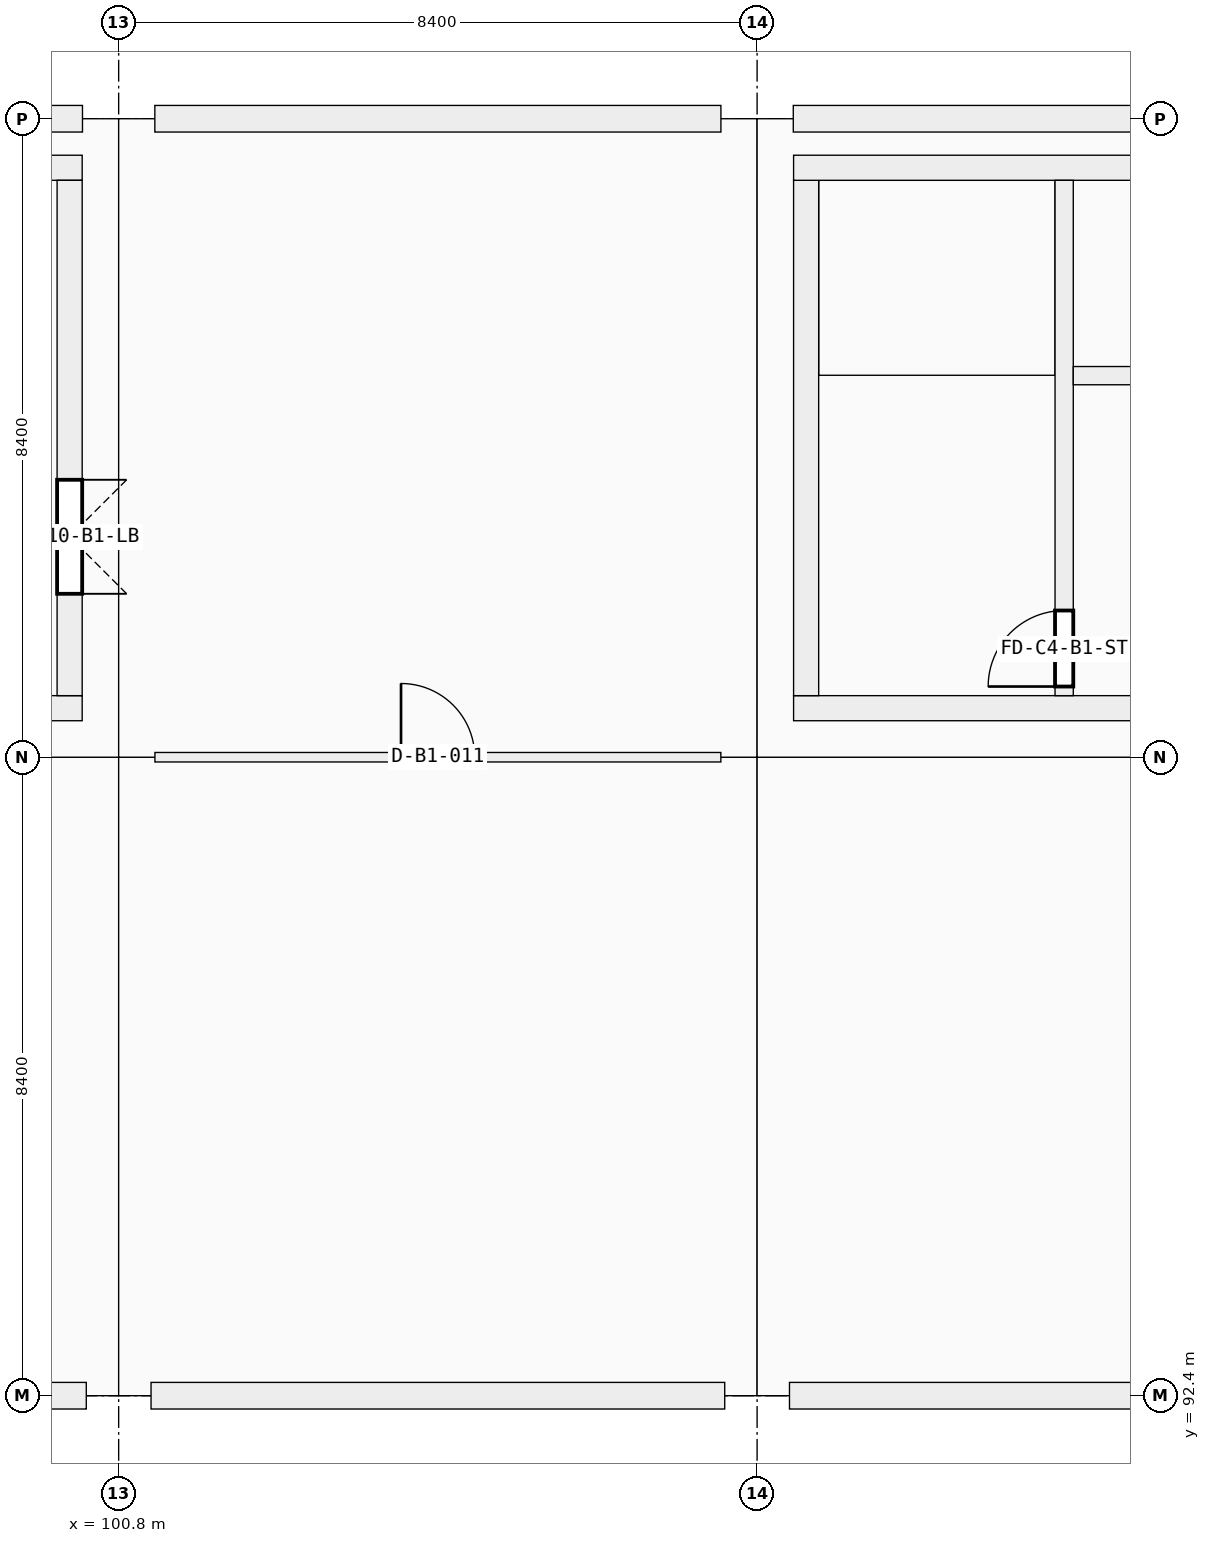
"""IFC4 building model, lengths in metres.
Left out: names, types, materials, properties, quantities, classifications, styles, units other than length and angle.
Written with IfcOpenShell. Run it as: python <this file> out.ifc"""

import sys

from ifc_helpers import new_model, si_unit, direction, frame, frame_2d, origin, origin_2d, place, context, subcontext, project, spatial, rectangle, extrude, element, fill, save


model = new_model("IFC4")
c1 = context("Model", 3, precision=1e-05, world=origin(), true_north=direction((0.0, 1.0)))
c2 = subcontext(c1, "Body", "Model", "MODEL_VIEW")
j1 = project(units=[si_unit("LENGTHUNIT", "METRE"), si_unit("PLANEANGLEUNIT", "RADIAN")], contexts=[c1])
p1 = place(None, origin())
s1 = spatial("IfcSite", under=j1, at=p1, CompositionType="ELEMENT")
p2 = place(p1, origin())
s2 = spatial("IfcBuilding", under=s1, at=p2, CompositionType="ELEMENT")
p3 = place(p2, frame((0.0, 0.0, -4.5)))
s3 = spatial("IfcBuildingStorey", under=s2, at=p3, CompositionType="ELEMENT", Elevation=-4.5)
p4 = place(p3, frame((100.8, 92.4, -0.35), z_axis=(0.0, 0.0, 1.0), x_axis=(1.0, 0.0, 0.0)))
e1 = element("IfcColumn", 1, at=p4, inside=s3, PredefinedType="COLUMN", context=c2, shape_type="SweptSolid", body=[
    extrude(rectangle(XDim=0.85, YDim=0.85, at=origin_2d()), origin(), (0.0, 0.0, 1.0), 4.5),
])
for number, where, z_axis, x_axis in (
    (2, (100.8, 100.8, -0.35), (0.0, 0.0, 1.0), (1.0, 0.0, 0.0)),
    (3, (100.8, 109.2, -0.35), (0.0, 0.0, 1.0), (1.0, 0.0, 0.0)),
):
    element("IfcColumn", number, at=place(p3, frame(where, z_axis=z_axis, x_axis=x_axis)), inside=s3, PredefinedType="COLUMN", context=c2, shape_type="SweptSolid", body=[
        extrude(rectangle(XDim=0.95, YDim=0.95, at=origin_2d()), origin(), (0.0, 0.0, 1.0), 4.85),
    ])
p5 = place(p3, frame((109.2, 92.4, -0.35), z_axis=(0.0, 0.0, 1.0), x_axis=(1.0, 0.0, 0.0)))
e4 = element("IfcColumn", 4, at=p5, inside=s3, PredefinedType="COLUMN", context=c2, shape_type="SweptSolid", body=[
    extrude(rectangle(XDim=0.85, YDim=0.85, at=origin_2d()), origin(), (0.0, 0.0, 1.0), 4.5),
])
for number, where, z_axis, x_axis in (
    (5, (109.2, 100.8, -0.35), (0.0, 0.0, 1.0), (1.0, 0.0, 0.0)),
    (6, (109.2, 109.2, -0.35), (0.0, 0.0, 1.0), (1.0, 0.0, 0.0)),
):
    element("IfcColumn", number, at=place(p3, frame(where, z_axis=z_axis, x_axis=x_axis)), inside=s3, PredefinedType="COLUMN", context=c2, shape_type="SweptSolid", body=[
        extrude(rectangle(XDim=0.95, YDim=0.95, at=origin_2d()), origin(), (0.0, 0.0, 1.0), 4.85),
    ])
p6 = place(p3, frame((100.374, 92.4, 0.0), z_axis=(0.0, 0.0, 1.0), x_axis=(-1.0, 0.0, 0.0)))
e7 = element("IfcWall", 7, at=p6, inside=s3, PredefinedType="SOLIDWALL", context=c2, shape_type="SweptSolid", body=[
    extrude(rectangle(XDim=7.548, YDim=0.35, at=frame_2d((3.774, 0.0))), origin(), (0.0, 0.0, 1.0), 3.35),
])
p7 = place(p3, frame((92.876, 109.2, 0.0), z_axis=(0.0, 0.0, 1.0), x_axis=(1.0, 0.0, 0.0)))
e8 = element("IfcWall", 8, at=p7, inside=s3, PredefinedType="SOLIDWALL", context=c2, shape_type="SweptSolid", body=[
    extrude(rectangle(XDim=7.448, YDim=0.35, at=frame_2d((3.724, 0.0))), origin(), (0.0, 0.0, 1.0), 3.35),
])
p8 = place(p3, frame((108.774, 92.4, 0.0), z_axis=(0.0, 0.0, 1.0), x_axis=(-1.0, 0.0, 0.0)))
e9 = element("IfcWall", 9, at=p8, inside=s3, PredefinedType="SOLIDWALL", context=c2, shape_type="SweptSolid", body=[
    extrude(rectangle(XDim=7.548, YDim=0.35, at=frame_2d((3.774, 0.0))), origin(), (0.0, 0.0, 1.0), 3.35),
])
p9 = place(p3, frame((101.276, 109.2, 0.0), z_axis=(0.0, 0.0, 1.0), x_axis=(1.0, 0.0, 0.0)))
e10 = element("IfcWall", 10, at=p9, inside=s3, PredefinedType="SOLIDWALL", context=c2, shape_type="SweptSolid", body=[
    extrude(rectangle(XDim=7.448, YDim=0.35, at=frame_2d((3.724, 0.0))), origin(), (0.0, 0.0, 1.0), 3.35),
])
p10 = place(p3, frame((117.149, 92.4, 0.0), z_axis=(0.0, 0.0, 1.0), x_axis=(-1.0, 0.0, 0.0)))
e11 = element("IfcWall", 11, at=p10, inside=s3, PredefinedType="SOLIDWALL", context=c2, shape_type="SweptSolid", body=[
    extrude(rectangle(XDim=7.523, YDim=0.35, at=frame_2d((3.761, 0.0))), origin(), (0.0, 0.0, 1.0), 3.35),
])
p11 = place(p3, frame((109.676, 109.2, 0.0), z_axis=(0.0, 0.0, 1.0), x_axis=(1.0, 0.0, 0.0)))
e12 = element("IfcWall", 12, at=p11, inside=s3, PredefinedType="SOLIDWALL", context=c2, shape_type="SweptSolid", body=[
    extrude(rectangle(XDim=7.448, YDim=0.35, at=frame_2d((3.724, 0.0))), origin(), (0.0, 0.0, 1.0), 3.35),
])
p12 = place(p3, frame((117.12, 101.445, -0.35), z_axis=(0.0, 0.0, 1.0), x_axis=(-1.0, 0.0, 0.0)))
e13 = element("IfcWall", 13, at=p12, inside=s3, PredefinedType="SHEAR", context=c2, shape_type="SweptSolid", body=[
    extrude(rectangle(XDim=7.44, YDim=0.33, at=frame_2d((3.72, 0.0))), origin(), (0.0, 0.0, 1.0), 4.85),
])
p13 = place(p12, frame((1.28, 0.0, 0.35)))
e14 = element("IfcOpeningElement", 14, at=p13, cuts=e13, PredefinedType="OPENING", context=c2, shape_type="SweptSolid", body=[
    extrude(rectangle(XDim=1.5, YDim=2.15, at=frame_2d((0.75, 1.075))), frame((0.0, 0.165, 0.0), z_axis=(0.0, -1.0, 0.0), x_axis=(1.0, 0.0, 0.0)), (0.0, 0.0, 1.0), 0.33),
])
p14 = place(p3, frame((109.845, 101.61, -0.35), z_axis=(0.0, 0.0, 1.0), x_axis=(0.0, 1.0, 0.0)))
e15 = element("IfcWall", 15, at=p14, inside=s3, PredefinedType="SHEAR", context=c2, shape_type="SweptSolid", body=[
    extrude(rectangle(XDim=6.78, YDim=0.33, at=frame_2d((3.39, 0.0))), origin(), (0.0, 0.0, 1.0), 4.85),
])
p15 = place(p3, frame((109.68, 108.555, -0.35), z_axis=(0.0, 0.0, 1.0), x_axis=(1.0, 0.0, 0.0)))
e16 = element("IfcWall", 16, at=p15, inside=s3, PredefinedType="SHEAR", context=c2, shape_type="SweptSolid", body=[
    extrude(rectangle(XDim=7.44, YDim=0.33, at=frame_2d((3.72, 0.0))), origin(), (0.0, 0.0, 1.0), 4.85),
])
p16 = place(p3, frame((113.24, 101.61, -0.35), z_axis=(0.0, 0.0, 1.0), x_axis=(0.0, 1.0, 0.0)))
e17 = element("IfcWall", 17, at=p16, inside=s3, PredefinedType="SHEAR", context=c2, shape_type="SweptSolid", body=[
    extrude(rectangle(XDim=6.78, YDim=0.24, at=frame_2d((3.39, 0.0))), origin(), (0.0, 0.0, 1.0), 4.85),
])
p17 = place(p16, frame((0.12, 0.0, 0.35)))
e18 = element("IfcOpeningElement", 18, at=p17, cuts=e17, PredefinedType="OPENING", context=c2, shape_type="SweptSolid", body=[
    extrude(rectangle(XDim=1.0, YDim=2.15, at=frame_2d((0.5, 1.075))), frame((0.0, 0.12, 0.0), z_axis=(0.0, -1.0, 0.0), x_axis=(1.0, 0.0, 0.0)), (0.0, 0.0, 1.0), 0.24),
])
p18 = place(p3, frame((113.36, 105.82, -0.35), z_axis=(0.0, 0.0, 1.0), x_axis=(1.0, 0.0, 0.0)))
e19 = element("IfcWall", 19, at=p18, inside=s3, PredefinedType="SHEAR", context=c2, shape_type="SweptSolid", body=[
    extrude(rectangle(XDim=3.43, YDim=0.24, at=frame_2d((1.715, 0.0))), origin(), (0.0, 0.0, 1.0), 4.85),
])
p19 = place(p18, frame((1.115, 0.0, 0.35)))
e20 = element("IfcOpeningElement", 20, at=p19, cuts=e19, PredefinedType="OPENING", context=c2, shape_type="SweptSolid", body=[
    extrude(rectangle(XDim=1.2, YDim=2.2, at=frame_2d((0.6, 1.1))), frame((0.0, 0.12, 0.0), z_axis=(0.0, -1.0, 0.0), x_axis=(1.0, 0.0, 0.0)), (0.0, 0.0, 1.0), 0.24),
])
p20 = place(p3, frame((100.32, 101.445, -0.35), z_axis=(0.0, 0.0, 1.0), x_axis=(-1.0, 0.0, 0.0)))
e21 = element("IfcWall", 21, at=p20, inside=s3, PredefinedType="SHEAR", context=c2, shape_type="SweptSolid", body=[
    extrude(rectangle(XDim=7.44, YDim=0.33, at=frame_2d((3.72, 0.0))), origin(), (0.0, 0.0, 1.0), 4.85),
])
p21 = place(p20, frame((1.28, 0.0, 0.35)))
e22 = element("IfcOpeningElement", 22, at=p21, cuts=e21, PredefinedType="OPENING", context=c2, shape_type="SweptSolid", body=[
    extrude(rectangle(XDim=1.5, YDim=2.15, at=frame_2d((0.75, 1.075))), frame((0.0, 0.165, 0.0), z_axis=(0.0, -1.0, 0.0), x_axis=(1.0, 0.0, 0.0)), (0.0, 0.0, 1.0), 0.33),
])
p22 = place(p3, frame((92.88, 108.555, -0.35), z_axis=(0.0, 0.0, 1.0), x_axis=(1.0, 0.0, 0.0)))
e23 = element("IfcWall", 23, at=p22, inside=s3, PredefinedType="SHEAR", context=c2, shape_type="SweptSolid", body=[
    extrude(rectangle(XDim=7.44, YDim=0.33, at=frame_2d((3.72, 0.0))), origin(), (0.0, 0.0, 1.0), 4.85),
])
p23 = place(p3, frame((100.155, 108.39, -0.35), z_axis=(0.0, 0.0, 1.0), x_axis=(0.0, -1.0, 0.0)))
e24 = element("IfcWall", 24, at=p23, inside=s3, PredefinedType="SHEAR", context=c2, shape_type="SweptSolid", body=[
    extrude(rectangle(XDim=6.78, YDim=0.33, at=frame_2d((3.39, 0.0))), origin(), (0.0, 0.0, 1.0), 4.85),
])
p24 = place(p23, frame((3.94, 0.0, 0.35)))
e25 = element("IfcOpeningElement", 25, at=p24, cuts=e24, PredefinedType="OPENING", context=c2, shape_type="SweptSolid", body=[
    extrude(rectangle(XDim=1.5, YDim=2.15, at=frame_2d((0.75, 1.075))), frame((0.0, 0.165, 0.0), z_axis=(0.0, -1.0, 0.0), x_axis=(1.0, 0.0, 0.0)), (0.0, 0.0, 1.0), 0.33),
])
p25 = place(p3, frame((101.277, 100.8, 0.0), z_axis=(0.0, 0.0, 1.0), x_axis=(1.0, 0.0, 0.0)))
e26 = element("IfcWall", 26, at=p25, inside=s3, PredefinedType="PARTITIONING", context=c2, shape_type="SweptSolid", body=[
    extrude(rectangle(XDim=7.446, YDim=0.125, at=frame_2d((3.723, 0.0))), origin(), (0.0, 0.0, 1.0), 3.27),
])
p26 = place(p25, frame((3.238, 0.0, 0.0)))
e27 = element("IfcOpeningElement", 27, at=p26, cuts=e26, PredefinedType="OPENING", context=c2, shape_type="SweptSolid", body=[
    extrude(rectangle(XDim=0.97, YDim=2.12, at=frame_2d((0.485, 1.06))), frame((0.0, 0.062, 0.0), z_axis=(0.0, -1.0, 0.0), x_axis=(1.0, 0.0, 0.0)), (0.0, 0.0, 1.0), 0.125),
])
p27 = place(p17, origin())
e28 = element("IfcDoor", 28, at=p27, inside=s3, OperationType="SINGLE_SWING_LEFT", PredefinedType="DOOR", context=c2, shape_type="SweptSolid", body=[
    extrude(rectangle(XDim=1.0, YDim=2.15, at=frame_2d((0.5, 1.075))), frame((0.0, 0.025, 0.0), z_axis=(0.0, -1.0, 0.0), x_axis=(1.0, 0.0, 0.0)), (0.0, 0.0, 1.0), 0.05),
])
fill(e18, e28)
p28 = place(p24, origin())
e29 = element("IfcDoor", 29, at=p28, inside=s3, OperationType="DOUBLE_DOOR_SINGLE_SWING", PredefinedType="DOOR", context=c2, shape_type="SweptSolid", body=[
    extrude(rectangle(XDim=1.5, YDim=2.15, at=frame_2d((0.75, 1.075))), frame((0.0, 0.025, 0.0), z_axis=(0.0, -1.0, 0.0), x_axis=(1.0, 0.0, 0.0)), (0.0, 0.0, 1.0), 0.05),
])
fill(e25, e29)
p29 = place(p26, origin())
e30 = element("IfcDoor", 30, at=p29, inside=s3, OperationType="SINGLE_SWING_LEFT", PredefinedType="DOOR", context=c2, shape_type="SweptSolid", body=[
    extrude(rectangle(XDim=0.97, YDim=2.12, at=frame_2d((0.485, 1.06))), frame((0.0, 0.025, 0.0), z_axis=(0.0, -1.0, 0.0), x_axis=(1.0, 0.0, 0.0)), (0.0, 0.0, 1.0), 0.05),
])
fill(e27, e30)
save(model, sys.argv[1])
